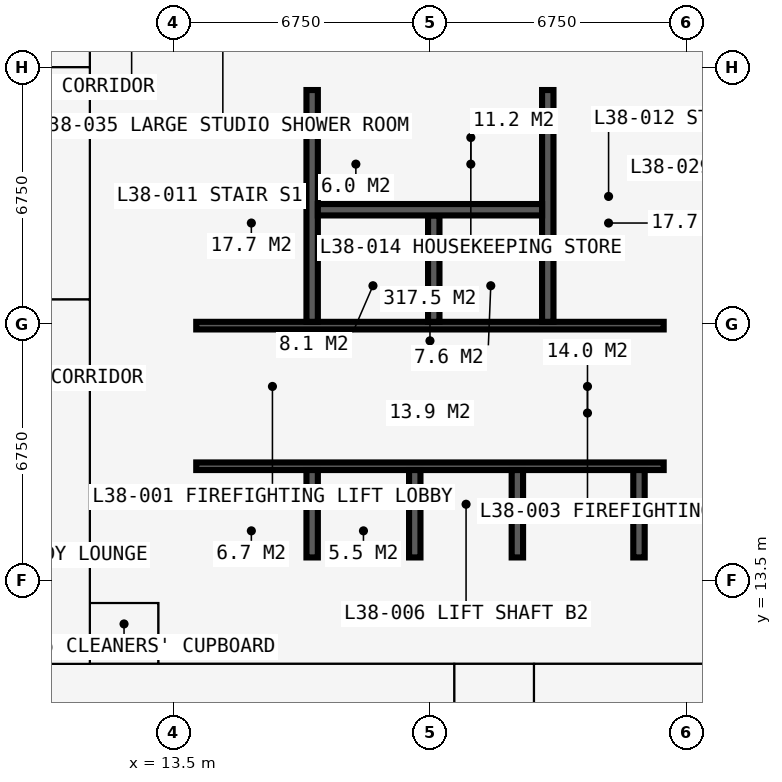
"""IFC4 building model, lengths in metres.
Left out: names, types, materials, properties, quantities, classifications, styles, units other than length and angle.
Written with IfcOpenShell. Run it as: python <this file> out.ifc"""

import sys

from ifc_helpers import new_model, si_unit, direction, frame, frame_2d, origin, place, context, subcontext, project, spatial, rectangle, extrude, element, fill, save


model = new_model("IFC4")
c1 = context("Model", 3, precision=1e-05, world=origin(), true_north=direction((0.0, 1.0)))
c2 = subcontext(c1, "Body", "Model", "MODEL_VIEW")
j1 = project(units=[si_unit("LENGTHUNIT", "METRE"), si_unit("PLANEANGLEUNIT", "RADIAN")], contexts=[c1])
p1 = place(None, origin())
s1 = spatial("IfcSite", under=j1, at=p1, CompositionType="ELEMENT")
p2 = place(p1, origin())
s2 = spatial("IfcBuilding", under=s1, at=p2, CompositionType="ELEMENT")
p3 = place(p2, frame((0.0, 0.0, 142.2)))
s3 = spatial("IfcBuildingStorey", under=s2, at=p3, CompositionType="ELEMENT", Elevation=142.2)
p4 = place(p3, frame((13.1, 13.5, 0.0), z_axis=(0.0, 0.0, 1.0), x_axis=(1.0, 0.0, 0.0)))
e1 = element("IfcWall", 1, at=p4, inside=s3, PredefinedType="SHEAR", context=c2, shape_type="SweptSolid", body=[
    extrude(rectangle(XDim=14.3, YDim=1.2, at=frame_2d((7.15, 0.0))), origin(), (0.0, 0.0, 1.0), 3.6),
])
p5 = place(p3, frame((26.9, 14.1, 0.0), z_axis=(0.0, 0.0, 1.0), x_axis=(0.0, 1.0, 0.0)))
e2 = element("IfcWall", 2, at=p5, inside=s3, PredefinedType="SHEAR", context=c2, shape_type="SweptSolid", body=[
    extrude(rectangle(XDim=12.3, YDim=1.0, at=frame_2d((6.15, 0.0))), origin(), (0.0, 0.0, 1.0), 3.6),
])
p6 = place(p5, frame((3.65, 0.0, 0.0)))
e3 = element("IfcOpeningElement", 3, at=p6, cuts=e2, PredefinedType="OPENING", context=c2, shape_type="SweptSolid", body=[
    extrude(rectangle(XDim=1.2, YDim=2.2, at=frame_2d((0.6, 1.1))), frame((0.0, 0.51, 0.0), z_axis=(0.0, -1.0, 0.0), x_axis=(1.0, 0.0, 0.0)), (0.0, 0.0, 1.0), 1.02),
])
p7 = place(p3, frame((27.4, 27.0, 0.0), z_axis=(0.0, 0.0, 1.0), x_axis=(-1.0, 0.0, 0.0)))
e4 = element("IfcWall", 4, at=p7, inside=s3, PredefinedType="SHEAR", context=c2, shape_type="SweptSolid", body=[
    extrude(rectangle(XDim=14.3, YDim=1.2, at=frame_2d((7.15, 0.0))), origin(), (0.0, 0.0, 1.0), 3.6),
])
p8 = place(p7, frame((5.225, 0.0, 0.0)))
e5 = element("IfcOpeningElement", 5, at=p8, cuts=e4, PredefinedType="OPENING", context=c2, shape_type="SweptSolid", body=[
    extrude(rectangle(XDim=0.9, YDim=2.2, at=frame_2d((0.45, 1.1))), frame((0.0, 0.61, 0.0), z_axis=(0.0, -1.0, 0.0), x_axis=(1.0, 0.0, 0.0)), (0.0, 0.0, 1.0), 1.22),
])
p9 = place(p7, frame((8.2, 0.0, 0.0)))
e6 = element("IfcOpeningElement", 6, at=p9, cuts=e4, PredefinedType="OPENING", context=c2, shape_type="SweptSolid", body=[
    extrude(rectangle(XDim=1.0, YDim=2.2, at=frame_2d((0.5, 1.1))), frame((0.0, 0.61, 0.0), z_axis=(0.0, -1.0, 0.0), x_axis=(1.0, 0.0, 0.0)), (0.0, 0.0, 1.0), 1.22),
])
p10 = place(p3, frame((13.6, 26.4, 0.0), z_axis=(0.0, 0.0, 1.0), x_axis=(0.0, -1.0, 0.0)))
e7 = element("IfcWall", 7, at=p10, inside=s3, PredefinedType="SHEAR", context=c2, shape_type="SweptSolid", body=[
    extrude(rectangle(XDim=12.3, YDim=1.0, at=frame_2d((6.15, 0.0))), origin(), (0.0, 0.0, 1.0), 3.6),
])
p11 = place(p10, frame((7.45, 0.0, 0.0)))
e8 = element("IfcOpeningElement", 8, at=p11, cuts=e7, PredefinedType="OPENING", context=c2, shape_type="SweptSolid", body=[
    extrude(rectangle(XDim=1.2, YDim=2.2, at=frame_2d((0.6, 1.1))), frame((0.0, 0.51, 0.0), z_axis=(0.0, -1.0, 0.0), x_axis=(1.0, 0.0, 0.0)), (0.0, 0.0, 1.0), 1.02),
])
p12 = place(p3, frame((14.1, 16.5, 0.0), z_axis=(0.0, 0.0, 1.0), x_axis=(1.0, 0.0, 0.0)))
e9 = element("IfcWall", 9, at=p12, inside=s3, PredefinedType="SHEAR", context=c2, shape_type="SweptSolid", body=[
    extrude(rectangle(XDim=12.3, YDim=0.2, at=frame_2d((6.15, 0.0))), origin(), (0.0, 0.0, 1.0), 3.6),
])
p13 = place(p12, frame((0.9, 0.0, 0.0)))
e10 = element("IfcOpeningElement", 10, at=p13, cuts=e9, PredefinedType="OPENING", context=c2, shape_type="SweptSolid", body=[
    extrude(rectangle(XDim=1.1, YDim=2.2, at=frame_2d((0.55, 1.1))), frame((0.0, 0.11, 0.0), z_axis=(0.0, -1.0, 0.0), x_axis=(1.0, 0.0, 0.0)), (0.0, 0.0, 1.0), 0.22),
])
p14 = place(p12, frame((4.31, 0.0, 0.0)))
e11 = element("IfcOpeningElement", 11, at=p14, cuts=e9, PredefinedType="OPENING", context=c2, shape_type="SweptSolid", body=[
    extrude(rectangle(XDim=1.1, YDim=2.2, at=frame_2d((0.55, 1.1))), frame((0.0, 0.11, 0.0), z_axis=(0.0, -1.0, 0.0), x_axis=(1.0, 0.0, 0.0)), (0.0, 0.0, 1.0), 0.22),
])
p15 = place(p12, frame((6.45, 0.0, 0.0)))
e12 = element("IfcOpeningElement", 12, at=p15, cuts=e9, PredefinedType="OPENING", context=c2, shape_type="SweptSolid", body=[
    extrude(rectangle(XDim=1.1, YDim=2.2, at=frame_2d((0.55, 1.1))), frame((0.0, 0.11, 0.0), z_axis=(0.0, -1.0, 0.0), x_axis=(1.0, 0.0, 0.0)), (0.0, 0.0, 1.0), 0.22),
])
p16 = place(p12, frame((9.5, 0.0, 0.0)))
e13 = element("IfcOpeningElement", 13, at=p16, cuts=e9, PredefinedType="OPENING", context=c2, shape_type="SweptSolid", body=[
    extrude(rectangle(XDim=1.1, YDim=2.2, at=frame_2d((0.55, 1.1))), frame((0.0, 0.11, 0.0), z_axis=(0.0, -1.0, 0.0), x_axis=(1.0, 0.0, 0.0)), (0.0, 0.0, 1.0), 0.22),
])
p17 = place(p3, frame((14.1, 20.2, 0.0), z_axis=(0.0, 0.0, 1.0), x_axis=(1.0, 0.0, 0.0)))
e14 = element("IfcWall", 14, at=p17, inside=s3, PredefinedType="SHEAR", context=c2, shape_type="SweptSolid", body=[
    extrude(rectangle(XDim=12.3, YDim=0.2, at=frame_2d((6.15, 0.0))), origin(), (0.0, 0.0, 1.0), 3.6),
])
p18 = place(p17, frame((4.56, 0.0, 0.0)))
e15 = element("IfcOpeningElement", 15, at=p18, cuts=e14, PredefinedType="OPENING", context=c2, shape_type="SweptSolid", body=[
    extrude(rectangle(XDim=1.1, YDim=2.2, at=frame_2d((0.55, 1.1))), frame((0.0, 0.11, 0.0), z_axis=(0.0, -1.0, 0.0), x_axis=(1.0, 0.0, 0.0)), (0.0, 0.0, 1.0), 0.22),
])
p19 = place(p17, frame((6.7, 0.0, 0.0)))
e16 = element("IfcOpeningElement", 16, at=p19, cuts=e14, PredefinedType="OPENING", context=c2, shape_type="SweptSolid", body=[
    extrude(rectangle(XDim=1.1, YDim=2.2, at=frame_2d((0.55, 1.1))), frame((0.0, 0.11, 0.0), z_axis=(0.0, -1.0, 0.0), x_axis=(1.0, 0.0, 0.0)), (0.0, 0.0, 1.0), 0.22),
])
p20 = place(p17, frame((0.35, 0.0, 0.0)))
e17 = element("IfcOpeningElement", 17, at=p20, cuts=e14, PredefinedType="OPENING", context=c2, shape_type="SweptSolid", body=[
    extrude(rectangle(XDim=1.1, YDim=2.2, at=frame_2d((0.55, 1.1))), frame((0.0, 0.11, 0.0), z_axis=(0.0, -1.0, 0.0), x_axis=(1.0, 0.0, 0.0)), (0.0, 0.0, 1.0), 0.22),
])
p21 = place(p17, frame((9.75, 0.0, 0.0)))
e18 = element("IfcOpeningElement", 18, at=p21, cuts=e14, PredefinedType="OPENING", context=c2, shape_type="SweptSolid", body=[
    extrude(rectangle(XDim=1.1, YDim=2.2, at=frame_2d((0.55, 1.1))), frame((0.0, 0.11, 0.0), z_axis=(0.0, -1.0, 0.0), x_axis=(1.0, 0.0, 0.0)), (0.0, 0.0, 1.0), 0.22),
])
for number, where, z_axis, x_axis in (
    (19, (17.15, 20.3, 0.0), (0.0, 0.0, 1.0), (0.0, 1.0, 0.0)),
    (20, (23.35, 20.3, 0.0), (0.0, 0.0, 1.0), (0.0, 1.0, 0.0)),
):
    element("IfcWall", number, at=place(p3, frame(where, z_axis=z_axis, x_axis=x_axis)), inside=s3, PredefinedType="SHEAR", context=c2, shape_type="SweptSolid", body=[
        extrude(rectangle(XDim=6.1, YDim=0.3, at=frame_2d((3.05, 0.0))), origin(), (0.0, 0.0, 1.0), 3.6),
    ])
p22 = place(p3, frame((20.35, 20.3, 0.0), z_axis=(0.0, 0.0, 1.0), x_axis=(0.0, 1.0, 0.0)))
e21 = element("IfcWall", 21, at=p22, inside=s3, PredefinedType="SHEAR", context=c2, shape_type="SweptSolid", body=[
    extrude(rectangle(XDim=2.8, YDim=0.3, at=frame_2d((1.4, 0.0))), origin(), (0.0, 0.0, 1.0), 3.6),
])
p23 = place(p3, frame((17.3, 23.25, 0.0), z_axis=(0.0, 0.0, 1.0), x_axis=(1.0, 0.0, 0.0)))
e22 = element("IfcWall", 22, at=p23, inside=s3, PredefinedType="SHEAR", context=c2, shape_type="SweptSolid", body=[
    extrude(rectangle(XDim=5.9, YDim=0.3, at=frame_2d((2.95, 0.0))), origin(), (0.0, 0.0, 1.0), 3.6),
])
for number, where, z_axis, x_axis in (
    (23, (17.15, 14.1, 0.0), (0.0, 0.0, 1.0), (0.0, 1.0, 0.0)),
    (24, (19.85, 14.1, 0.0), (0.0, 0.0, 1.0), (0.0, 1.0, 0.0)),
    (25, (22.55, 14.1, 0.0), (0.0, 0.0, 1.0), (0.0, 1.0, 0.0)),
    (26, (25.75, 14.1, 0.0), (0.0, 0.0, 1.0), (0.0, 1.0, 0.0)),
):
    element("IfcWall", number, at=place(p3, frame(where, z_axis=z_axis, x_axis=x_axis)), inside=s3, PredefinedType="SHEAR", context=c2, shape_type="SweptSolid", body=[
        extrude(rectangle(XDim=2.3, YDim=0.3, at=frame_2d((1.15, 0.0))), origin(), (0.0, 0.0, 1.0), 3.6),
    ])
p24 = place(p3, frame((18.185, 16.6, 0.0), z_axis=(0.0, 0.0, 1.0), x_axis=(0.0, 1.0, 0.0)))
e27 = element("IfcWall", 27, at=p24, inside=s3, PredefinedType="PARTITIONING", context=c2, shape_type="SweptSolid", body=[
    extrude(rectangle(XDim=3.5, YDim=0.15, at=frame_2d((1.75, 0.0))), origin(), (0.0, 0.0, 1.0), 3.375),
])
p25 = place(p24, frame((1.15, 0.0, 0.0)))
e28 = element("IfcOpeningElement", 28, at=p25, cuts=e27, PredefinedType="OPENING", context=c2, shape_type="SweptSolid", body=[
    extrude(rectangle(XDim=1.2, YDim=2.2, at=frame_2d((0.6, 1.1))), frame((0.0, 0.085, 0.0), z_axis=(0.0, -1.0, 0.0), x_axis=(1.0, 0.0, 0.0)), (0.0, 0.0, 1.0), 0.17),
])
p26 = place(p3, frame((22.315, 16.6, 0.0), z_axis=(0.0, 0.0, 1.0), x_axis=(0.0, 1.0, 0.0)))
e29 = element("IfcWall", 29, at=p26, inside=s3, PredefinedType="PARTITIONING", context=c2, shape_type="SweptSolid", body=[
    extrude(rectangle(XDim=3.5, YDim=0.15, at=frame_2d((1.75, 0.0))), origin(), (0.0, 0.0, 1.0), 3.375),
])
p27 = place(p26, frame((1.15, 0.0, 0.0)))
e30 = element("IfcOpeningElement", 30, at=p27, cuts=e29, PredefinedType="OPENING", context=c2, shape_type="SweptSolid", body=[
    extrude(rectangle(XDim=1.2, YDim=2.2, at=frame_2d((0.6, 1.1))), frame((0.0, 0.085, 0.0), z_axis=(0.0, -1.0, 0.0), x_axis=(1.0, 0.0, 0.0)), (0.0, 0.0, 1.0), 0.17),
])
p28 = place(p3, frame((19.375, 23.4, 0.0), z_axis=(0.0, 0.0, 1.0), x_axis=(0.0, 1.0, 0.0)))
e31 = element("IfcWall", 31, at=p28, inside=s3, PredefinedType="PARTITIONING", context=c2, shape_type="SweptSolid", body=[
    extrude(rectangle(XDim=3.0, YDim=0.15, at=frame_2d((1.5, 0.0))), origin(), (0.0, 0.0, 1.0), 3.375),
])
p29 = place(p3, frame((-0.734, 27.0, 0.0), z_axis=(0.0, 0.0, 1.0), x_axis=(1.0, 0.0, 0.0)))
e32 = element("IfcWall", 32, at=p29, inside=s3, PredefinedType="PARTITIONING", context=c2, shape_type="SweptSolid", body=[
    extrude(rectangle(XDim=12.034, YDim=0.15, at=frame_2d((6.017, 0.0))), origin(), (0.0, 0.0, 1.0), 2.806),
])
p30 = place(p3, frame((4.85, 20.887, 0.0), z_axis=(0.0, 0.0, 1.0), x_axis=(1.0, 0.0, 0.0)))
e33 = element("IfcWall", 33, at=p30, inside=s3, PredefinedType="PARTITIONING", context=c2, shape_type="SweptSolid", body=[
    extrude(rectangle(XDim=6.45, YDim=0.15, at=frame_2d((3.225, 0.0))), origin(), (0.0, 0.0, 1.0), 3.375),
])
p31 = place(p3, frame((10.125, 11.3, 0.0), z_axis=(0.0, 0.0, 1.0), x_axis=(1.0, 0.0, 0.0)))
e34 = element("IfcWall", 34, at=p31, inside=s3, PredefinedType="PARTITIONING", context=c2, shape_type="SweptSolid", body=[
    extrude(rectangle(XDim=20.25, YDim=0.15, at=frame_2d((10.125, 0.0))), origin(), (0.0, 0.0, 1.0), 3.375),
])
p32 = place(p31, frame((11.312, 0.0, 0.0)))
e35 = element("IfcOpeningElement", 35, at=p32, cuts=e34, PredefinedType="OPENING", context=c2, shape_type="SweptSolid", body=[
    extrude(rectangle(XDim=1.0, YDim=2.2, at=frame_2d((0.5, 1.1))), frame((0.0, 0.085, 0.0), z_axis=(0.0, -1.0, 0.0), x_axis=(1.0, 0.0, 0.0)), (0.0, 0.0, 1.0), 0.17),
])
p33 = place(p3, frame((11.3, 11.3, 0.0), z_axis=(0.0, 0.0, 1.0), x_axis=(0.0, 1.0, 0.0)))
e36 = element("IfcWall", 36, at=p33, inside=s3, PredefinedType="PARTITIONING", context=c2, shape_type="SweptSolid", body=[
    extrude(rectangle(XDim=19.3, YDim=0.15, at=frame_2d((9.65, 0.0))), origin(), (0.0, 0.0, 1.0), 3.375),
])
p34 = place(p33, frame((18.1, 0.0, 0.0)))
e37 = element("IfcOpeningElement", 37, at=p34, cuts=e36, PredefinedType="OPENING", context=c2, shape_type="SweptSolid", body=[
    extrude(rectangle(XDim=1.0, YDim=2.2, at=frame_2d((0.5, 1.1))), frame((0.0, 0.085, 0.0), z_axis=(0.0, -1.0, 0.0), x_axis=(1.0, 0.0, 0.0)), (0.0, 0.0, 1.0), 0.17),
])
p35 = place(p33, frame((12.137, 0.0, 0.0)))
e38 = element("IfcOpeningElement", 38, at=p35, cuts=e36, PredefinedType="OPENING", context=c2, shape_type="SweptSolid", body=[
    extrude(rectangle(XDim=1.0, YDim=2.2, at=frame_2d((0.5, 1.1))), frame((0.0, 0.085, 0.0), z_axis=(0.0, -1.0, 0.0), x_axis=(1.0, 0.0, 0.0)), (0.0, 0.0, 1.0), 0.17),
])
p36 = place(p3, frame((11.3, 12.9, 0.0), z_axis=(0.0, 0.0, 1.0), x_axis=(1.0, 0.0, 0.0)))
e39 = element("IfcWall", 39, at=p36, inside=s3, PredefinedType="PARTITIONING", context=c2, shape_type="SweptSolid", body=[
    extrude(rectangle(XDim=1.8, YDim=0.15, at=frame_2d((0.9, 0.0))), origin(), (0.0, 0.0, 1.0), 2.806),
])
p37 = place(p36, frame((0.4, 0.0, 0.0)))
e40 = element("IfcOpeningElement", 40, at=p37, cuts=e39, PredefinedType="OPENING", context=c2, shape_type="SweptSolid", body=[
    extrude(rectangle(XDim=0.95, YDim=2.2, at=frame_2d((0.475, 1.1))), frame((0.0, 0.085, 0.0), z_axis=(0.0, -1.0, 0.0), x_axis=(1.0, 0.0, 0.0)), (0.0, 0.0, 1.0), 0.17),
])
p38 = place(p3, frame((13.1, 11.3, 0.0), z_axis=(0.0, 0.0, 1.0), x_axis=(0.0, 1.0, 0.0)))
e41 = element("IfcWall", 41, at=p38, inside=s3, PredefinedType="PARTITIONING", context=c2, shape_type="SweptSolid", body=[
    extrude(rectangle(XDim=1.6, YDim=0.15, at=frame_2d((0.8, 0.0))), origin(), (0.0, 0.0, 1.0), 3.375),
])
p39 = place(p3, frame((20.887, 4.85, 0.0), z_axis=(0.0, 0.0, 1.0), x_axis=(0.0, 1.0, 0.0)))
e42 = element("IfcWall", 42, at=p39, inside=s3, PredefinedType="PARTITIONING", context=c2, shape_type="SweptSolid", body=[
    extrude(rectangle(XDim=6.45, YDim=0.15, at=frame_2d((3.225, 0.0))), origin(), (0.0, 0.0, 1.0), 3.375),
])
p40 = place(p3, frame((22.988, 4.85, 0.0), z_axis=(0.0, 0.0, 1.0), x_axis=(0.0, 1.0, 0.0)))
e43 = element("IfcWall", 43, at=p40, inside=s3, PredefinedType="PARTITIONING", context=c2, shape_type="SweptSolid", body=[
    extrude(rectangle(XDim=6.45, YDim=0.15, at=frame_2d((3.225, 0.0))), origin(), (0.0, 0.0, 1.0), 3.375),
])
p41 = place(p40, frame((2.75, 0.0, 0.0)))
e44 = element("IfcOpeningElement", 44, at=p41, cuts=e43, PredefinedType="OPENING", context=c2, shape_type="SweptSolid", body=[
    extrude(rectangle(XDim=0.95, YDim=2.2, at=frame_2d((0.475, 1.1))), frame((0.0, 0.085, 0.0), z_axis=(0.0, -1.0, 0.0), x_axis=(1.0, 0.0, 0.0)), (0.0, 0.0, 1.0), 0.17),
])
p42 = place(p13, origin())
e45 = element("IfcDoor", 45, at=p42, inside=s3, OperationType="DOUBLE_DOOR_SLIDING", PredefinedType="DOOR", context=c2, shape_type="SweptSolid", body=[
    extrude(rectangle(XDim=1.1, YDim=2.2, at=frame_2d((0.55, 1.1))), frame((0.0, 0.025, 0.0), z_axis=(0.0, -1.0, 0.0), x_axis=(1.0, 0.0, 0.0)), (0.0, 0.0, 1.0), 0.05),
])
fill(e10, e45)
p43 = place(p14, origin())
e46 = element("IfcDoor", 46, at=p43, inside=s3, OperationType="DOUBLE_DOOR_SLIDING", PredefinedType="DOOR", context=c2, shape_type="SweptSolid", body=[
    extrude(rectangle(XDim=1.1, YDim=2.2, at=frame_2d((0.55, 1.1))), frame((0.0, 0.025, 0.0), z_axis=(0.0, -1.0, 0.0), x_axis=(1.0, 0.0, 0.0)), (0.0, 0.0, 1.0), 0.05),
])
fill(e11, e46)
p44 = place(p15, origin())
e47 = element("IfcDoor", 47, at=p44, inside=s3, OperationType="DOUBLE_DOOR_SLIDING", PredefinedType="DOOR", context=c2, shape_type="SweptSolid", body=[
    extrude(rectangle(XDim=1.1, YDim=2.2, at=frame_2d((0.55, 1.1))), frame((0.0, 0.025, 0.0), z_axis=(0.0, -1.0, 0.0), x_axis=(1.0, 0.0, 0.0)), (0.0, 0.0, 1.0), 0.05),
])
fill(e12, e47)
p45 = place(p16, origin())
e48 = element("IfcDoor", 48, at=p45, inside=s3, OperationType="DOUBLE_DOOR_SLIDING", PredefinedType="DOOR", context=c2, shape_type="SweptSolid", body=[
    extrude(rectangle(XDim=1.1, YDim=2.2, at=frame_2d((0.55, 1.1))), frame((0.0, 0.025, 0.0), z_axis=(0.0, -1.0, 0.0), x_axis=(1.0, 0.0, 0.0)), (0.0, 0.0, 1.0), 0.05),
])
fill(e13, e48)
p46 = place(p18, origin())
e49 = element("IfcDoor", 49, at=p46, inside=s3, OperationType="DOUBLE_DOOR_SLIDING", PredefinedType="DOOR", context=c2, shape_type="SweptSolid", body=[
    extrude(rectangle(XDim=1.1, YDim=2.2, at=frame_2d((0.55, 1.1))), frame((0.0, 0.025, 0.0), z_axis=(0.0, -1.0, 0.0), x_axis=(1.0, 0.0, 0.0)), (0.0, 0.0, 1.0), 0.05),
])
fill(e15, e49)
p47 = place(p19, origin())
e50 = element("IfcDoor", 50, at=p47, inside=s3, OperationType="DOUBLE_DOOR_SLIDING", PredefinedType="DOOR", context=c2, shape_type="SweptSolid", body=[
    extrude(rectangle(XDim=1.1, YDim=2.2, at=frame_2d((0.55, 1.1))), frame((0.0, 0.025, 0.0), z_axis=(0.0, -1.0, 0.0), x_axis=(1.0, 0.0, 0.0)), (0.0, 0.0, 1.0), 0.05),
])
fill(e16, e50)
p48 = place(p11, origin())
e51 = element("IfcDoor", 51, at=p48, inside=s3, OperationType="DOUBLE_DOOR_SINGLE_SWING", PredefinedType="DOOR", context=c2, shape_type="SweptSolid", body=[
    extrude(rectangle(XDim=1.2, YDim=2.2, at=frame_2d((0.6, 1.1))), frame((0.0, 0.025, 0.0), z_axis=(0.0, -1.0, 0.0), x_axis=(1.0, 0.0, 0.0)), (0.0, 0.0, 1.0), 0.05),
])
fill(e8, e51)
p49 = place(p6, origin())
e52 = element("IfcDoor", 52, at=p49, inside=s3, OperationType="DOUBLE_DOOR_SINGLE_SWING", PredefinedType="DOOR", context=c2, shape_type="SweptSolid", body=[
    extrude(rectangle(XDim=1.2, YDim=2.2, at=frame_2d((0.6, 1.1))), frame((0.0, 0.025, 0.0), z_axis=(0.0, -1.0, 0.0), x_axis=(1.0, 0.0, 0.0)), (0.0, 0.0, 1.0), 0.05),
])
fill(e3, e52)
p50 = place(p25, origin())
e53 = element("IfcDoor", 53, at=p50, inside=s3, OperationType="DOUBLE_DOOR_SINGLE_SWING", PredefinedType="DOOR", context=c2, shape_type="SweptSolid", body=[
    extrude(rectangle(XDim=1.2, YDim=2.2, at=frame_2d((0.6, 1.1))), frame((0.0, 0.025, 0.0), z_axis=(0.0, -1.0, 0.0), x_axis=(1.0, 0.0, 0.0)), (0.0, 0.0, 1.0), 0.05),
])
fill(e28, e53)
p51 = place(p27, origin())
e54 = element("IfcDoor", 54, at=p51, inside=s3, OperationType="DOUBLE_DOOR_SINGLE_SWING", PredefinedType="DOOR", context=c2, shape_type="SweptSolid", body=[
    extrude(rectangle(XDim=1.2, YDim=2.2, at=frame_2d((0.6, 1.1))), frame((0.0, 0.025, 0.0), z_axis=(0.0, -1.0, 0.0), x_axis=(1.0, 0.0, 0.0)), (0.0, 0.0, 1.0), 0.05),
])
fill(e30, e54)
p52 = place(p8, origin())
e55 = element("IfcDoor", 55, at=p52, inside=s3, OperationType="SINGLE_SWING_LEFT", PredefinedType="DOOR", context=c2, shape_type="SweptSolid", body=[
    extrude(rectangle(XDim=0.9, YDim=2.2, at=frame_2d((0.45, 1.1))), frame((0.0, 0.4, 0.0), z_axis=(0.0, -1.0, 0.0), x_axis=(1.0, 0.0, 0.0)), (0.0, 0.0, 1.0), 0.8),
])
fill(e5, e55)
p53 = place(p9, origin())
e56 = element("IfcDoor", 56, at=p53, inside=s3, OperationType="SINGLE_SWING_LEFT", PredefinedType="DOOR", context=c2, shape_type="SweptSolid", body=[
    extrude(rectangle(XDim=1.0, YDim=2.2, at=frame_2d((0.5, 1.1))), frame((0.0, 0.025, 0.0), z_axis=(0.0, -1.0, 0.0), x_axis=(1.0, 0.0, 0.0)), (0.0, 0.0, 1.0), 0.05),
])
fill(e6, e56)
p54 = place(p20, origin())
e57 = element("IfcDoor", 57, at=p54, inside=s3, OperationType="SINGLE_SWING_LEFT", PredefinedType="DOOR", context=c2, shape_type="SweptSolid", body=[
    extrude(rectangle(XDim=1.1, YDim=2.2, at=frame_2d((0.55, 1.1))), frame((0.0, 0.025, 0.0), z_axis=(0.0, -1.0, 0.0), x_axis=(1.0, 0.0, 0.0)), (0.0, 0.0, 1.0), 0.05),
])
fill(e17, e57)
p55 = place(p21, origin())
e58 = element("IfcDoor", 58, at=p55, inside=s3, OperationType="SINGLE_SWING_LEFT", PredefinedType="DOOR", context=c2, shape_type="SweptSolid", body=[
    extrude(rectangle(XDim=1.1, YDim=2.2, at=frame_2d((0.55, 1.1))), frame((0.0, 0.025, 0.0), z_axis=(0.0, -1.0, 0.0), x_axis=(1.0, 0.0, 0.0)), (0.0, 0.0, 1.0), 0.05),
])
fill(e18, e58)
p56 = place(p37, origin())
e59 = element("IfcDoor", 59, at=p56, inside=s3, OperationType="SINGLE_SWING_LEFT", PredefinedType="DOOR", context=c2, shape_type="SweptSolid", body=[
    extrude(rectangle(XDim=0.95, YDim=2.2, at=frame_2d((0.475, 1.1))), frame((0.0, 0.025, 0.0), z_axis=(0.0, -1.0, 0.0), x_axis=(1.0, 0.0, 0.0)), (0.0, 0.0, 1.0), 0.05),
])
fill(e40, e59)
p57 = place(p32, origin())
e60 = element("IfcDoor", 60, at=p57, inside=s3, OperationType="SINGLE_SWING_LEFT", PredefinedType="DOOR", context=c2, shape_type="SweptSolid", body=[
    extrude(rectangle(XDim=1.0, YDim=2.2, at=frame_2d((0.5, 1.1))), frame((0.0, 0.025, 0.0), z_axis=(0.0, -1.0, 0.0), x_axis=(1.0, 0.0, 0.0)), (0.0, 0.0, 1.0), 0.05),
])
fill(e35, e60)
p58 = place(p35, origin())
e61 = element("IfcDoor", 61, at=p58, inside=s3, OperationType="SINGLE_SWING_LEFT", PredefinedType="DOOR", context=c2, shape_type="SweptSolid", body=[
    extrude(rectangle(XDim=1.0, YDim=2.2, at=frame_2d((0.5, 1.1))), frame((0.0, 0.025, 0.0), z_axis=(0.0, -1.0, 0.0), x_axis=(1.0, 0.0, 0.0)), (0.0, 0.0, 1.0), 0.05),
])
fill(e38, e61)
save(model, sys.argv[1])
